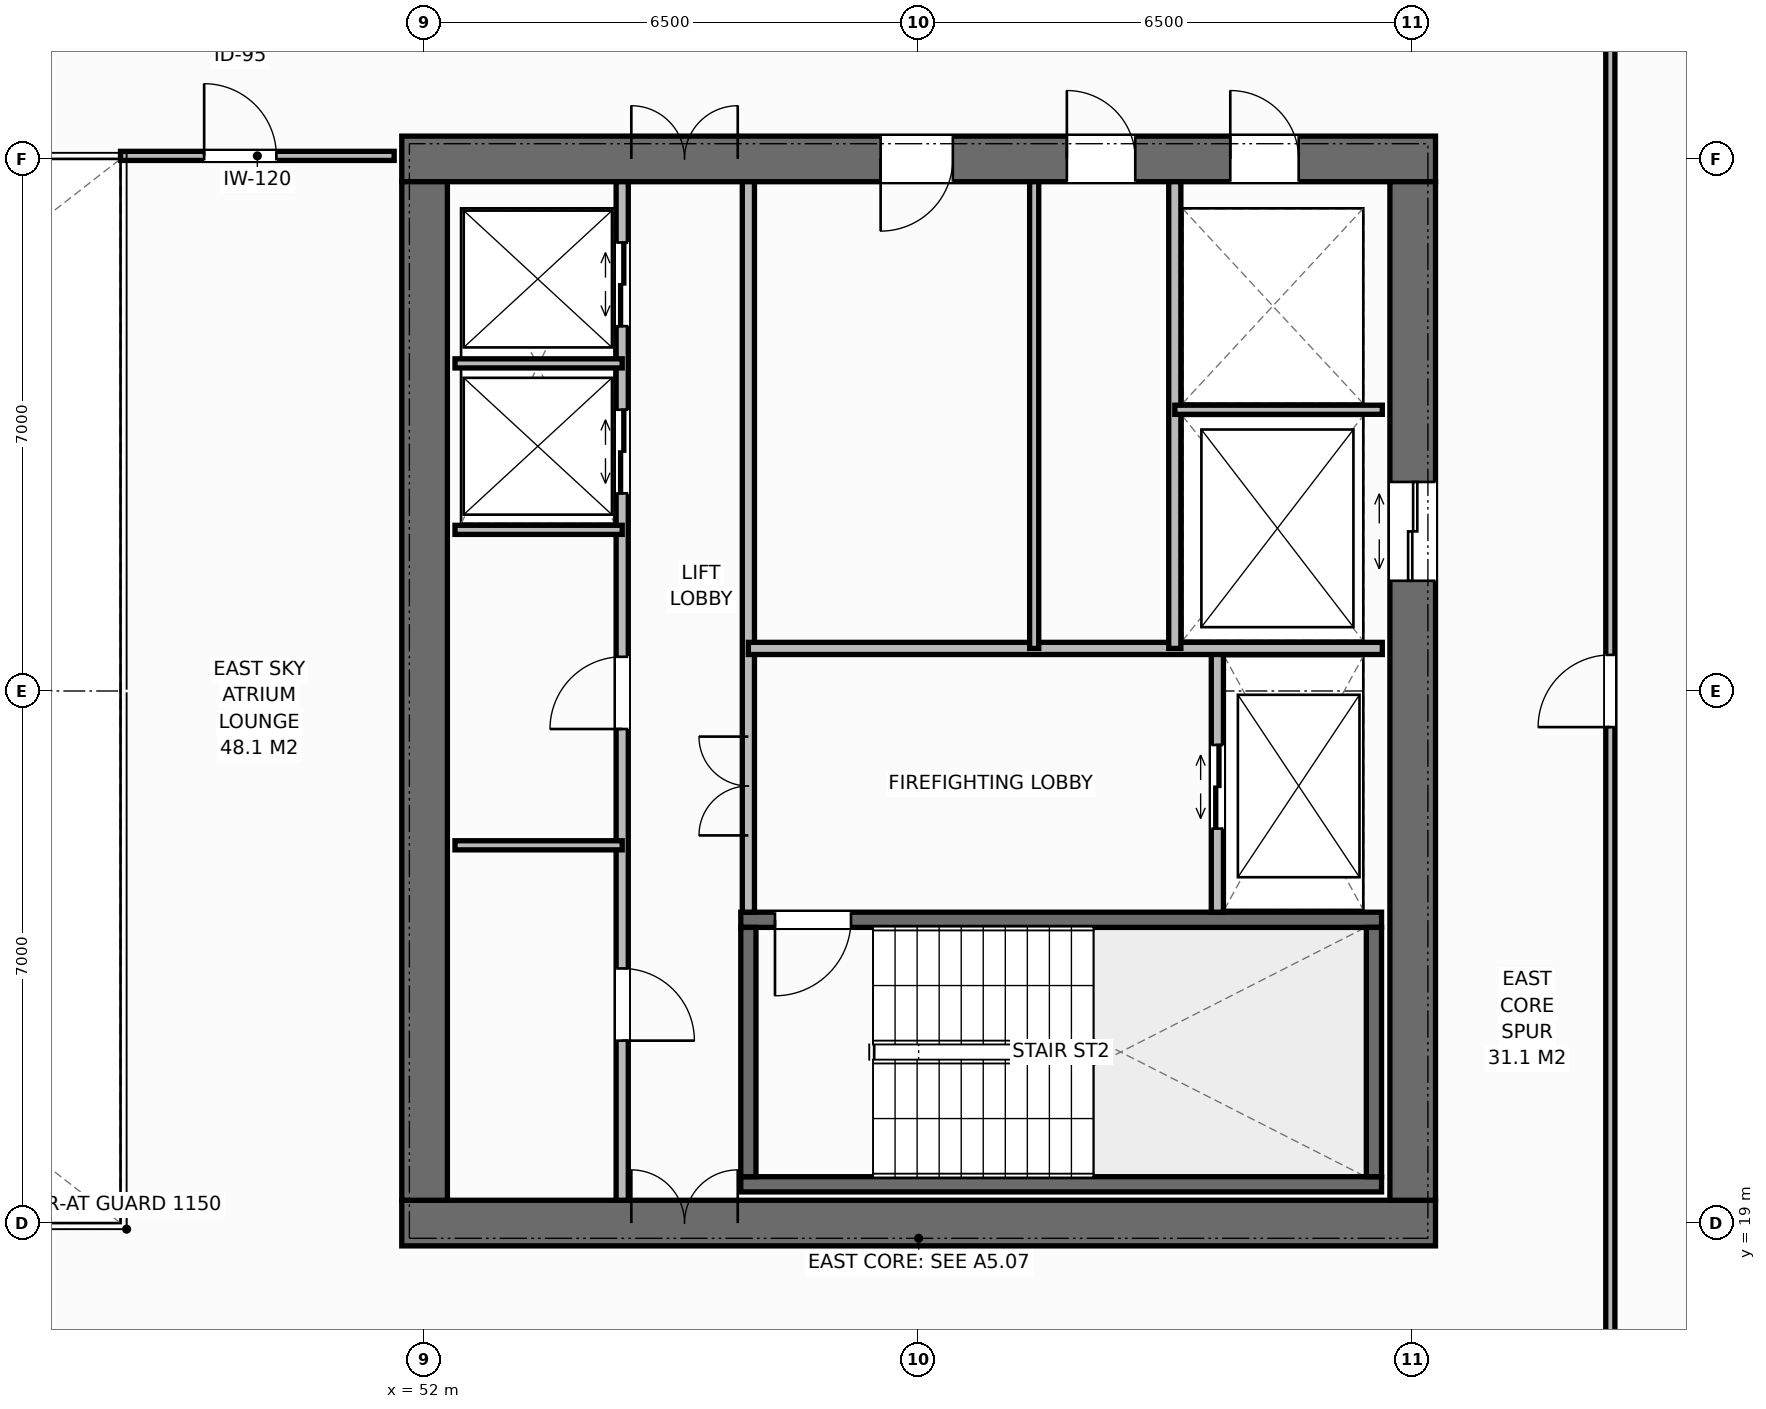
"""IFC4 building model, lengths in metres.
Left out: names, types, materials, properties, quantities, classifications, styles, units other than length and angle.
Written with IfcOpenShell. Run it as: python <this file> out.ifc"""

import sys

from ifc_helpers import new_model, si_unit, direction, frame, frame_2d, origin, place, context, subcontext, project, spatial, rectangle, extrude, element, fill, save


model = new_model("IFC4")
c1 = context("Model", 3, precision=1e-05, world=origin(), true_north=direction((0.0, 1.0)))
c2 = subcontext(c1, "Body", "Model", "MODEL_VIEW")
j1 = project(units=[si_unit("LENGTHUNIT", "METRE"), si_unit("PLANEANGLEUNIT", "RADIAN")], contexts=[c1])
p1 = place(None, origin())
s1 = spatial("IfcSite", under=j1, at=p1, CompositionType="ELEMENT")
p2 = place(p1, origin())
s2 = spatial("IfcBuilding", under=s1, at=p2, CompositionType="ELEMENT")
p3 = place(p2, frame((0.0, 0.0, 159.4)))
s3 = spatial("IfcBuildingStorey", under=s2, at=p3, CompositionType="ELEMENT", Elevation=159.4)
p4 = place(p3, frame((51.7, 19.0, 0.0), z_axis=(0.0, 0.0, 1.0), x_axis=(1.0, 0.0, 0.0)))
e1 = element("IfcWall", 1, at=p4, inside=s3, PredefinedType="SHEAR", context=c2, shape_type="SweptSolid", body=[
    extrude(rectangle(XDim=13.6, YDim=0.6, at=frame_2d((6.8, 0.0))), origin(), (0.0, 0.0, 1.0), 3.8),
])
p5 = place(p4, frame((3.02, 0.0, 0.0)))
e2 = element("IfcOpeningElement", 2, at=p5, cuts=e1, PredefinedType="OPENING", context=c2, shape_type="SweptSolid", body=[
    extrude(rectangle(XDim=1.4, YDim=2.2, at=frame_2d((0.7, 1.1))), frame((0.0, 0.31, 0.0), z_axis=(0.0, -1.0, 0.0), x_axis=(1.0, 0.0, 0.0)), (0.0, 0.0, 1.0), 0.62),
])
p6 = place(p3, frame((51.7, 33.0, 0.0), z_axis=(0.0, 0.0, 1.0), x_axis=(1.0, 0.0, 0.0)))
e3 = element("IfcWall", 3, at=p6, inside=s3, PredefinedType="SHEAR", context=c2, shape_type="SweptSolid", body=[
    extrude(rectangle(XDim=13.6, YDim=0.6, at=frame_2d((6.8, 0.0))), origin(), (0.0, 0.0, 1.0), 3.8),
])
p7 = place(p6, frame((3.02, 0.0, 0.0)))
e4 = element("IfcOpeningElement", 4, at=p7, cuts=e3, PredefinedType="OPENING", context=c2, shape_type="SweptSolid", body=[
    extrude(rectangle(XDim=1.4, YDim=2.2, at=frame_2d((0.7, 1.1))), frame((0.0, 0.31, 0.0), z_axis=(0.0, -1.0, 0.0), x_axis=(1.0, 0.0, 0.0)), (0.0, 0.0, 1.0), 0.62),
])
p8 = place(p6, frame((10.9, 0.0, 0.0)))
e5 = element("IfcOpeningElement", 5, at=p8, cuts=e3, PredefinedType="OPENING", context=c2, shape_type="SweptSolid", body=[
    extrude(rectangle(XDim=0.9, YDim=2.15, at=frame_2d((0.45, 1.075))), frame((0.0, 0.31, 0.0), z_axis=(0.0, -1.0, 0.0), x_axis=(1.0, 0.0, 0.0)), (0.0, 0.0, 1.0), 0.62),
])
p9 = place(p6, frame((6.3, 0.0, 0.0)))
e6 = element("IfcOpeningElement", 6, at=p9, cuts=e3, PredefinedType="OPENING", context=c2, shape_type="SweptSolid", body=[
    extrude(rectangle(XDim=0.95, YDim=2.15, at=frame_2d((0.475, 1.075))), frame((0.0, 0.31, 0.0), z_axis=(0.0, -1.0, 0.0), x_axis=(1.0, 0.0, 0.0)), (0.0, 0.0, 1.0), 0.62),
])
p10 = place(p6, frame((8.75, 0.0, 0.0)))
e7 = element("IfcOpeningElement", 7, at=p10, cuts=e3, PredefinedType="OPENING", context=c2, shape_type="SweptSolid", body=[
    extrude(rectangle(XDim=0.9, YDim=2.15, at=frame_2d((0.45, 1.075))), frame((0.0, 0.31, 0.0), z_axis=(0.0, -1.0, 0.0), x_axis=(1.0, 0.0, 0.0)), (0.0, 0.0, 1.0), 0.62),
])
p11 = place(p3, frame((52.0, 19.3, 0.0), z_axis=(0.0, 0.0, 1.0), x_axis=(0.0, 1.0, 0.0)))
e8 = element("IfcWall", 8, at=p11, inside=s3, PredefinedType="SHEAR", context=c2, shape_type="SweptSolid", body=[
    extrude(rectangle(XDim=13.4, YDim=0.6, at=frame_2d((6.7, 0.0))), origin(), (0.0, 0.0, 1.0), 3.8),
])
p12 = place(p3, frame((65.0, 19.3, 0.0), z_axis=(0.0, 0.0, 1.0), x_axis=(0.0, 1.0, 0.0)))
e9 = element("IfcWall", 9, at=p12, inside=s3, PredefinedType="SHEAR", context=c2, shape_type="SweptSolid", body=[
    extrude(rectangle(XDim=13.4, YDim=0.6, at=frame_2d((6.7, 0.0))), origin(), (0.0, 0.0, 1.0), 3.8),
])
p13 = place(p12, frame((8.15, 0.0, 0.0)))
e10 = element("IfcOpeningElement", 10, at=p13, cuts=e9, PredefinedType="OPENING", context=c2, shape_type="SweptSolid", body=[
    extrude(rectangle(XDim=1.3, YDim=2.2, at=frame_2d((0.65, 1.1))), frame((0.0, 0.31, 0.0), z_axis=(0.0, -1.0, 0.0), x_axis=(1.0, 0.0, 0.0)), (0.0, 0.0, 1.0), 0.62),
])
p14 = place(p3, frame((56.16, 19.51, 0.0), z_axis=(0.0, 0.0, 1.0), x_axis=(1.0, 0.0, 0.0)))
e11 = element("IfcWall", 11, at=p14, inside=s3, PredefinedType="SHEAR", context=c2, shape_type="SweptSolid", body=[
    extrude(rectangle(XDim=8.43, YDim=0.2, at=frame_2d((4.215, 0.0))), origin(), (0.0, 0.0, 1.0), 3.8),
])
p15 = place(p3, frame((56.16, 22.99, 0.0), z_axis=(0.0, 0.0, 1.0), x_axis=(1.0, 0.0, 0.0)))
e12 = element("IfcWall", 12, at=p15, inside=s3, PredefinedType="SHEAR", context=c2, shape_type="SweptSolid", body=[
    extrude(rectangle(XDim=8.43, YDim=0.2, at=frame_2d((4.215, 0.0))), origin(), (0.0, 0.0, 1.0), 3.8),
])
p16 = place(p15, frame((0.45, 0.0, 0.0)))
e13 = element("IfcOpeningElement", 13, at=p16, cuts=e12, PredefinedType="OPENING", context=c2, shape_type="SweptSolid", body=[
    extrude(rectangle(XDim=1.0, YDim=2.15, at=frame_2d((0.5, 1.075))), frame((0.0, 0.11, 0.0), z_axis=(0.0, -1.0, 0.0), x_axis=(1.0, 0.0, 0.0)), (0.0, 0.0, 1.0), 0.22),
])
for number, where, z_axis, x_axis in (
    (14, (56.26, 19.61, 0.0), (0.0, 0.0, 1.0), (0.0, 1.0, 0.0)),
    (15, (64.49, 19.61, 0.0), (0.0, 0.0, 1.0), (0.0, 1.0, 0.0)),
):
    element("IfcWall", number, at=place(p3, frame(where, z_axis=z_axis, x_axis=x_axis)), inside=s3, PredefinedType="SHEAR", context=c2, shape_type="SweptSolid", body=[
        extrude(rectangle(XDim=3.28, YDim=0.2, at=frame_2d((1.64, 0.0))), origin(), (0.0, 0.0, 1.0), 3.8),
    ])
p17 = place(p3, frame((54.6, 19.3, 0.0), z_axis=(0.0, 0.0, 1.0), x_axis=(0.0, 1.0, 0.0)))
e16 = element("IfcWall", 16, at=p17, inside=s3, PredefinedType="STANDARD", context=c2, shape_type="SweptSolid", body=[
    extrude(rectangle(XDim=13.4, YDim=0.16, at=frame_2d((6.7, 0.0))), origin(), (0.0, 0.0, 1.0), 3.572),
])
p18 = place(p17, frame((2.1, 0.0, 0.0)))
e17 = element("IfcOpeningElement", 17, at=p18, cuts=e16, PredefinedType="OPENING", context=c2, shape_type="SweptSolid", body=[
    extrude(rectangle(XDim=0.95, YDim=2.15, at=frame_2d((0.475, 1.075))), frame((0.0, 0.09, 0.0), z_axis=(0.0, -1.0, 0.0), x_axis=(1.0, 0.0, 0.0)), (0.0, 0.0, 1.0), 0.18),
])
p19 = place(p17, frame((6.2, 0.0, 0.0)))
e18 = element("IfcOpeningElement", 18, at=p19, cuts=e16, PredefinedType="OPENING", context=c2, shape_type="SweptSolid", body=[
    extrude(rectangle(XDim=0.95, YDim=2.15, at=frame_2d((0.475, 1.075))), frame((0.0, 0.09, 0.0), z_axis=(0.0, -1.0, 0.0), x_axis=(1.0, 0.0, 0.0)), (0.0, 0.0, 1.0), 0.18),
])
p20 = place(p17, frame((9.3, 0.0, 0.0)))
e19 = element("IfcOpeningElement", 19, at=p20, cuts=e16, PredefinedType="OPENING", context=c2, shape_type="SweptSolid", body=[
    extrude(rectangle(XDim=1.1, YDim=2.2, at=frame_2d((0.55, 1.1))), frame((0.0, 0.09, 0.0), z_axis=(0.0, -1.0, 0.0), x_axis=(1.0, 0.0, 0.0)), (0.0, 0.0, 1.0), 0.18),
])
p21 = place(p17, frame((11.5, 0.0, 0.0)))
e20 = element("IfcOpeningElement", 20, at=p21, cuts=e16, PredefinedType="OPENING", context=c2, shape_type="SweptSolid", body=[
    extrude(rectangle(XDim=1.1, YDim=2.2, at=frame_2d((0.55, 1.1))), frame((0.0, 0.09, 0.0), z_axis=(0.0, -1.0, 0.0), x_axis=(1.0, 0.0, 0.0)), (0.0, 0.0, 1.0), 0.18),
])
p22 = place(p3, frame((56.26, 23.09, 0.0), z_axis=(0.0, 0.0, 1.0), x_axis=(0.0, 1.0, 0.0)))
e21 = element("IfcWall", 21, at=p22, inside=s3, PredefinedType="STANDARD", context=c2, shape_type="SweptSolid", body=[
    extrude(rectangle(XDim=9.61, YDim=0.16, at=frame_2d((4.805, 0.0))), origin(), (0.0, 0.0, 1.0), 3.572),
])
p23 = place(p22, frame((1.01, 0.0, 0.0)))
e22 = element("IfcOpeningElement", 22, at=p23, cuts=e21, PredefinedType="OPENING", context=c2, shape_type="SweptSolid", body=[
    extrude(rectangle(XDim=1.3, YDim=2.2, at=frame_2d((0.65, 1.1))), frame((0.0, 0.09, 0.0), z_axis=(0.0, -1.0, 0.0), x_axis=(1.0, 0.0, 0.0)), (0.0, 0.0, 1.0), 0.18),
])
for number, where, z_axis, x_axis in (
    (23, (52.4, 23.97, 0.0), (0.0, 0.0, 1.0), (1.0, 0.0, 0.0)),
    (24, (52.4, 28.12, 0.0), (0.0, 0.0, 1.0), (1.0, 0.0, 0.0)),
    (25, (52.4, 30.31, 0.0), (0.0, 0.0, 1.0), (1.0, 0.0, 0.0)),
):
    element("IfcWall", number, at=place(p3, frame(where, z_axis=z_axis, x_axis=x_axis)), inside=s3, PredefinedType="PARTITIONING", context=c2, shape_type="SweptSolid", body=[
        extrude(rectangle(XDim=2.2, YDim=0.12, at=frame_2d((1.1, 0.0))), origin(), (0.0, 0.0, 1.0), 3.572),
    ])
p24 = place(p3, frame((62.43, 23.09, 0.0), z_axis=(0.0, 0.0, 1.0), x_axis=(0.0, 1.0, 0.0)))
e26 = element("IfcWall", 26, at=p24, inside=s3, PredefinedType="STANDARD", context=c2, shape_type="SweptSolid", body=[
    extrude(rectangle(XDim=3.47, YDim=0.16, at=frame_2d((1.735, 0.0))), origin(), (0.0, 0.0, 1.0), 3.572),
])
p25 = place(p24, frame((1.1, 0.0, 0.0)))
e27 = element("IfcOpeningElement", 27, at=p25, cuts=e26, PredefinedType="OPENING", context=c2, shape_type="SweptSolid", body=[
    extrude(rectangle(XDim=1.1, YDim=2.2, at=frame_2d((0.55, 1.1))), frame((0.0, 0.09, 0.0), z_axis=(0.0, -1.0, 0.0), x_axis=(1.0, 0.0, 0.0)), (0.0, 0.0, 1.0), 0.18),
])
p26 = place(p3, frame((56.26, 26.56, 0.0), z_axis=(0.0, 0.0, 1.0), x_axis=(1.0, 0.0, 0.0)))
e28 = element("IfcWall", 28, at=p26, inside=s3, PredefinedType="STANDARD", context=c2, shape_type="SweptSolid", body=[
    extrude(rectangle(XDim=8.34, YDim=0.16, at=frame_2d((4.17, 0.0))), origin(), (0.0, 0.0, 1.0), 3.572),
])
p27 = place(p3, frame((61.87, 26.56, 0.0), z_axis=(0.0, 0.0, 1.0), x_axis=(0.0, 1.0, 0.0)))
e29 = element("IfcWall", 29, at=p27, inside=s3, PredefinedType="STANDARD", context=c2, shape_type="SweptSolid", body=[
    extrude(rectangle(XDim=6.14, YDim=0.16, at=frame_2d((3.07, 0.0))), origin(), (0.0, 0.0, 1.0), 3.572),
])
p28 = place(p3, frame((61.87, 29.7, 0.0), z_axis=(0.0, 0.0, 1.0), x_axis=(1.0, 0.0, 0.0)))
e30 = element("IfcWall", 30, at=p28, inside=s3, PredefinedType="PARTITIONING", context=c2, shape_type="SweptSolid", body=[
    extrude(rectangle(XDim=2.73, YDim=0.12, at=frame_2d((1.365, 0.0))), origin(), (0.0, 0.0, 1.0), 3.572),
])
p29 = place(p3, frame((60.02, 26.56, 0.0), z_axis=(0.0, 0.0, 1.0), x_axis=(0.0, 1.0, 0.0)))
e31 = element("IfcWall", 31, at=p29, inside=s3, PredefinedType="PARTITIONING", context=c2, shape_type="SweptSolid", body=[
    extrude(rectangle(XDim=6.14, YDim=0.12, at=frame_2d((3.07, 0.0))), origin(), (0.0, 0.0, 1.0), 3.572),
])
p30 = place(p3, frame((48.0, 33.04, 0.0), z_axis=(0.0, 0.0, 1.0), x_axis=(1.0, 0.0, 0.0)))
e32 = element("IfcWall", 32, at=p30, inside=s3, PredefinedType="PARTITIONING", context=c2, shape_type="SweptSolid", body=[
    extrude(rectangle(XDim=3.6, YDim=0.12, at=frame_2d((1.8, 0.0))), origin(), (0.0, 0.0, 1.0), 3.312),
])
p31 = place(p30, frame((1.1, 0.0, 0.0)))
e33 = element("IfcOpeningElement", 33, at=p31, cuts=e32, PredefinedType="OPENING", context=c2, shape_type="SweptSolid", body=[
    extrude(rectangle(XDim=0.95, YDim=2.15, at=frame_2d((0.475, 1.075))), frame((0.0, 0.07, 0.0), z_axis=(0.0, -1.0, 0.0), x_axis=(1.0, 0.0, 0.0)), (0.0, 0.0, 1.0), 0.14),
])
p32 = place(p3, frame((67.6, 16.5, 0.0), z_axis=(0.0, 0.0, 1.0), x_axis=(0.0, 1.0, 0.0)))
e34 = element("IfcWall", 34, at=p32, inside=s3, PredefinedType="PARTITIONING", context=c2, shape_type="SweptSolid", body=[
    extrude(rectangle(XDim=19.0, YDim=0.12, at=frame_2d((9.5, 0.0))), origin(), (0.0, 0.0, 1.0), 3.572),
])
p33 = place(p32, frame((9.025, 0.0, 0.0)))
e35 = element("IfcOpeningElement", 35, at=p33, cuts=e34, PredefinedType="OPENING", context=c2, shape_type="SweptSolid", body=[
    extrude(rectangle(XDim=0.95, YDim=2.15, at=frame_2d((0.475, 1.075))), frame((0.0, 0.07, 0.0), z_axis=(0.0, -1.0, 0.0), x_axis=(1.0, 0.0, 0.0)), (0.0, 0.0, 1.0), 0.14),
])
p34 = place(p5, origin())
e36 = element("IfcDoor", 36, at=p34, inside=s3, OperationType="DOUBLE_DOOR_SINGLE_SWING", PredefinedType="DOOR", context=c2, shape_type="SweptSolid", body=[
    extrude(rectangle(XDim=1.4, YDim=2.2, at=frame_2d((0.7, 1.1))), frame((0.0, 0.075, 0.0), z_axis=(0.0, -1.0, 0.0), x_axis=(1.0, 0.0, 0.0)), (0.0, 0.0, 1.0), 0.05),
])
fill(e2, e36)
p35 = place(p7, origin())
e37 = element("IfcDoor", 37, at=p35, inside=s3, OperationType="DOUBLE_DOOR_SINGLE_SWING", PredefinedType="DOOR", context=c2, shape_type="SweptSolid", body=[
    extrude(rectangle(XDim=1.4, YDim=2.2, at=frame_2d((0.7, 1.1))), frame((0.0, -0.025, 0.0), z_axis=(0.0, -1.0, 0.0), x_axis=(1.0, 0.0, 0.0)), (0.0, 0.0, 1.0), 0.05),
])
fill(e4, e37)
p36 = place(p18, origin())
e38 = element("IfcDoor", 38, at=p36, inside=s3, OperationType="SINGLE_SWING_RIGHT", PredefinedType="DOOR", context=c2, shape_type="SweptSolid", body=[
    extrude(rectangle(XDim=0.95, YDim=2.15, at=frame_2d((0.475, 1.075))), frame((0.0, 0.025, 0.0), z_axis=(0.0, -1.0, 0.0), x_axis=(1.0, 0.0, 0.0)), (0.0, 0.0, 1.0), 0.05),
])
fill(e17, e38)
p37 = place(p19, origin())
e39 = element("IfcDoor", 39, at=p37, inside=s3, OperationType="SINGLE_SWING_LEFT", PredefinedType="DOOR", context=c2, shape_type="SweptSolid", body=[
    extrude(rectangle(XDim=0.95, YDim=2.15, at=frame_2d((0.475, 1.075))), frame((0.0, 0.025, 0.0), z_axis=(0.0, -1.0, 0.0), x_axis=(1.0, 0.0, 0.0)), (0.0, 0.0, 1.0), 0.05),
])
fill(e18, e39)
p38 = place(p20, origin())
e40 = element("IfcDoor", 40, at=p38, inside=s3, OperationType="DOUBLE_DOOR_SLIDING", PredefinedType="DOOR", context=c2, shape_type="SweptSolid", body=[
    extrude(rectangle(XDim=1.1, YDim=2.2, at=frame_2d((0.55, 1.1))), frame((0.0, 0.025, 0.0), z_axis=(0.0, -1.0, 0.0), x_axis=(1.0, 0.0, 0.0)), (0.0, 0.0, 1.0), 0.05),
])
fill(e19, e40)
p39 = place(p21, origin())
e41 = element("IfcDoor", 41, at=p39, inside=s3, OperationType="DOUBLE_DOOR_SLIDING", PredefinedType="DOOR", context=c2, shape_type="SweptSolid", body=[
    extrude(rectangle(XDim=1.1, YDim=2.2, at=frame_2d((0.55, 1.1))), frame((0.0, 0.025, 0.0), z_axis=(0.0, -1.0, 0.0), x_axis=(1.0, 0.0, 0.0)), (0.0, 0.0, 1.0), 0.05),
])
fill(e20, e41)
p40 = place(p16, origin())
e42 = element("IfcDoor", 42, at=p40, inside=s3, OperationType="SINGLE_SWING_RIGHT", PredefinedType="DOOR", context=c2, shape_type="SweptSolid", body=[
    extrude(rectangle(XDim=1.0, YDim=2.15, at=frame_2d((0.5, 1.075))), frame((0.0, 0.025, 0.0), z_axis=(0.0, -1.0, 0.0), x_axis=(1.0, 0.0, 0.0)), (0.0, 0.0, 1.0), 0.05),
])
fill(e13, e42)
p41 = place(p25, origin())
e43 = element("IfcDoor", 43, at=p41, inside=s3, OperationType="DOUBLE_DOOR_SLIDING", PredefinedType="DOOR", context=c2, shape_type="SweptSolid", body=[
    extrude(rectangle(XDim=1.1, YDim=2.2, at=frame_2d((0.55, 1.1))), frame((0.0, 0.025, 0.0), z_axis=(0.0, -1.0, 0.0), x_axis=(1.0, 0.0, 0.0)), (0.0, 0.0, 1.0), 0.05),
])
fill(e27, e43)
p42 = place(p23, origin())
e44 = element("IfcDoor", 44, at=p42, inside=s3, OperationType="DOUBLE_DOOR_SINGLE_SWING", PredefinedType="DOOR", context=c2, shape_type="SweptSolid", body=[
    extrude(rectangle(XDim=1.3, YDim=2.2, at=frame_2d((0.65, 1.1))), frame((0.0, 0.025, 0.0), z_axis=(0.0, -1.0, 0.0), x_axis=(1.0, 0.0, 0.0)), (0.0, 0.0, 1.0), 0.05),
])
fill(e22, e44)
p43 = place(p13, origin())
e45 = element("IfcDoor", 45, at=p43, inside=s3, OperationType="DOUBLE_DOOR_SLIDING", PredefinedType="DOOR", context=c2, shape_type="SweptSolid", body=[
    extrude(rectangle(XDim=1.3, YDim=2.2, at=frame_2d((0.65, 1.1))), frame((0.0, 0.025, 0.0), z_axis=(0.0, -1.0, 0.0), x_axis=(1.0, 0.0, 0.0)), (0.0, 0.0, 1.0), 0.05),
])
fill(e10, e45)
p44 = place(p8, origin())
e46 = element("IfcDoor", 46, at=p44, inside=s3, OperationType="SINGLE_SWING_LEFT", PredefinedType="DOOR", context=c2, shape_type="SweptSolid", body=[
    extrude(rectangle(XDim=0.9, YDim=2.15, at=frame_2d((0.45, 1.075))), frame((0.0, -0.025, 0.0), z_axis=(0.0, -1.0, 0.0), x_axis=(1.0, 0.0, 0.0)), (0.0, 0.0, 1.0), 0.05),
])
fill(e5, e46)
p45 = place(p9, origin())
e47 = element("IfcDoor", 47, at=p45, inside=s3, OperationType="SINGLE_SWING_RIGHT", PredefinedType="DOOR", context=c2, shape_type="SweptSolid", body=[
    extrude(rectangle(XDim=0.95, YDim=2.15, at=frame_2d((0.475, 1.075))), frame((0.0, -0.025, 0.0), z_axis=(0.0, -1.0, 0.0), x_axis=(1.0, 0.0, 0.0)), (0.0, 0.0, 1.0), 0.05),
])
fill(e6, e47)
p46 = place(p10, origin())
e48 = element("IfcDoor", 48, at=p46, inside=s3, OperationType="SINGLE_SWING_LEFT", PredefinedType="DOOR", context=c2, shape_type="SweptSolid", body=[
    extrude(rectangle(XDim=0.9, YDim=2.15, at=frame_2d((0.45, 1.075))), frame((0.0, -0.025, 0.0), z_axis=(0.0, -1.0, 0.0), x_axis=(1.0, 0.0, 0.0)), (0.0, 0.0, 1.0), 0.05),
])
fill(e7, e48)
p47 = place(p31, origin())
e49 = element("IfcDoor", 49, at=p47, inside=s3, OperationType="SINGLE_SWING_LEFT", PredefinedType="DOOR", context=c2, shape_type="SweptSolid", body=[
    extrude(rectangle(XDim=0.95, YDim=2.15, at=frame_2d((0.475, 1.075))), frame((0.0, 0.025, 0.0), z_axis=(0.0, -1.0, 0.0), x_axis=(1.0, 0.0, 0.0)), (0.0, 0.0, 1.0), 0.05),
])
fill(e33, e49)
p48 = place(p33, origin())
e50 = element("IfcDoor", 50, at=p48, inside=s3, OperationType="SINGLE_SWING_LEFT", PredefinedType="DOOR", context=c2, shape_type="SweptSolid", body=[
    extrude(rectangle(XDim=0.95, YDim=2.15, at=frame_2d((0.475, 1.075))), frame((0.0, 0.025, 0.0), z_axis=(0.0, -1.0, 0.0), x_axis=(1.0, 0.0, 0.0)), (0.0, 0.0, 1.0), 0.05),
])
fill(e35, e50)
save(model, sys.argv[1])
